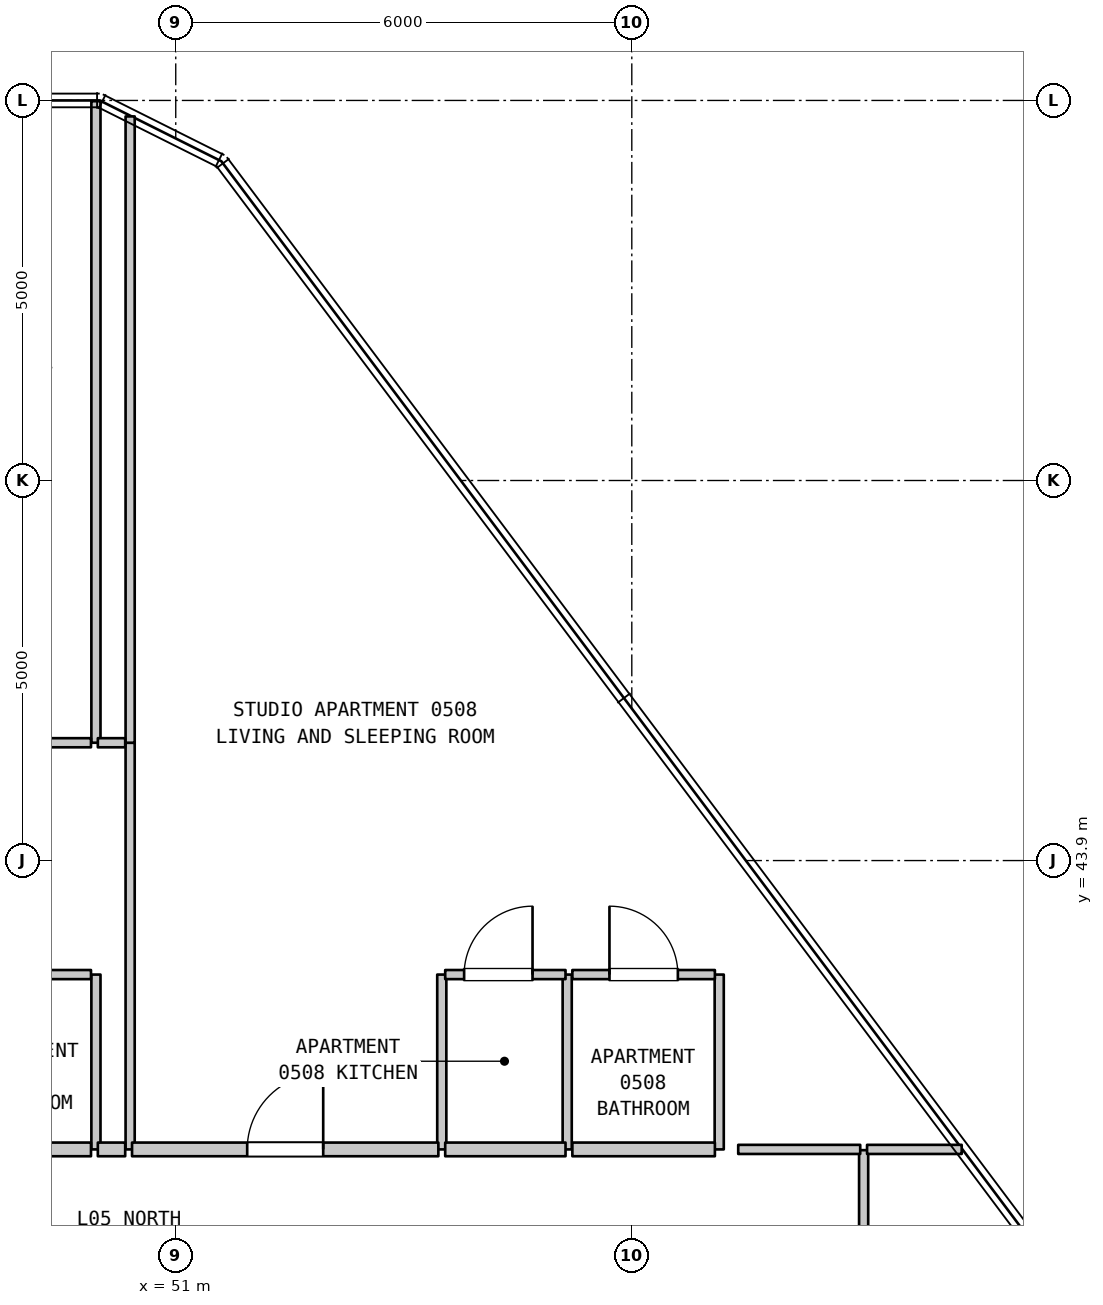
"""IFC4 building model, lengths in metres.
Left out: names, types, materials, properties, quantities, classifications, styles, units other than length and angle.
Written with IfcOpenShell. Run it as: python <this file> out.ifc"""

import sys

from ifc_helpers import new_model, si_unit, direction, frame, frame_2d, origin, place, context, subcontext, project, spatial, rectangle, extrude, element, fill, save


model = new_model("IFC4")
c1 = context("Model", 3, precision=1e-05, world=origin(), true_north=direction((0.0, 1.0)))
c2 = subcontext(c1, "Body", "Model", "MODEL_VIEW")
j1 = project(units=[si_unit("LENGTHUNIT", "METRE"), si_unit("PLANEANGLEUNIT", "RADIAN")], contexts=[c1])
p1 = place(None, origin())
s1 = spatial("IfcSite", under=j1, at=p1, CompositionType="ELEMENT")
p2 = place(p1, origin())
s2 = spatial("IfcBuilding", under=s1, at=p2, CompositionType="ELEMENT")
p3 = place(p2, frame((0.0, 0.0, 27.7)))
s3 = spatial("IfcBuildingStorey", under=s2, at=p3, CompositionType="ELEMENT", Elevation=27.7)
p4 = place(p3, frame((49.95, 40.1, 0.0), z_axis=(0.0, 0.0, 1.0), x_axis=(0.0, 1.0, 0.0)))
e1 = element("IfcWall", 1, at=p4, inside=s3, PredefinedType="PARTITIONING", context=c2, shape_type="SweptSolid", body=[
    extrude(rectangle(XDim=2.3, YDim=0.12, at=frame_2d((1.15, 0.0))), origin(), (0.0, 0.0, 1.0), 3.385),
])
p5 = place(p3, frame((49.95, 45.45, 0.0), z_axis=(0.0, 0.0, 1.0), x_axis=(0.0, 1.0, 0.0)))
e2 = element("IfcWall", 2, at=p5, inside=s3, PredefinedType="PARTITIONING", context=c2, shape_type="SweptSolid", body=[
    extrude(rectangle(XDim=8.44, YDim=0.12, at=frame_2d((4.22, 0.0))), origin(), (0.0, 0.0, 1.0), 3.385),
])
p6 = place(p3, frame((50.4, 40.1, 0.0), z_axis=(0.0, 0.0, 1.0), x_axis=(0.0, 1.0, 0.0)))
e3 = element("IfcWall", 3, at=p6, inside=s3, PredefinedType="PARTITIONING", context=c2, shape_type="SweptSolid", body=[
    extrude(rectangle(XDim=5.35, YDim=0.12, at=frame_2d((2.675, 0.0))), origin(), (0.0, 0.0, 1.0), 3.385),
])
p7 = place(p3, frame((50.4, 45.45, 0.0), z_axis=(0.0, 0.0, 1.0), x_axis=(0.0, 1.0, 0.0)))
e4 = element("IfcWall", 4, at=p7, inside=s3, PredefinedType="PARTITIONING", context=c2, shape_type="SweptSolid", body=[
    extrude(rectangle(XDim=8.24, YDim=0.12, at=frame_2d((4.12, 0.0))), origin(), (0.0, 0.0, 1.0), 3.385),
])
for number, where, z_axis, x_axis in (
    (5, (54.5, 40.1, 0.0), (0.0, 0.0, 1.0), (0.0, 1.0, 0.0)),
    (6, (56.15, 40.1, 0.0), (0.0, 0.0, 1.0), (0.0, 1.0, 0.0)),
    (7, (58.15, 40.1, 0.0), (0.0, 0.0, 1.0), (0.0, 1.0, 0.0)),
):
    element("IfcWall", number, at=place(p3, frame(where, z_axis=z_axis, x_axis=x_axis)), inside=s3, PredefinedType="PARTITIONING", context=c2, shape_type="SweptSolid", body=[
        extrude(rectangle(XDim=2.3, YDim=0.12, at=frame_2d((1.15, 0.0))), origin(), (0.0, 0.0, 1.0), 3.385),
    ])
p8 = place(p3, frame((60.05, 37.89, 0.0), z_axis=(0.0, 0.0, 1.0), x_axis=(0.0, 1.0, 0.0)))
e8 = element("IfcWall", 8, at=p8, inside=s3, PredefinedType="PARTITIONING", context=c2, shape_type="SweptSolid", body=[
    extrude(rectangle(XDim=2.2, YDim=0.12, at=frame_2d((1.1, 0.0))), origin(), (0.0, 0.0, 1.0), 3.385),
])
p9 = place(p3, frame((45.963, 40.1, 0.0), z_axis=(0.0, 0.0, 1.0), x_axis=(1.0, 0.0, 0.0)))
e9 = element("IfcWall", 9, at=p9, inside=s3, PredefinedType="STANDARD", context=c2, shape_type="SweptSolid", body=[
    extrude(rectangle(XDim=3.922, YDim=0.18, at=frame_2d((1.961, 0.0))), origin(), (0.0, 0.0, 1.0), 3.385),
])
p10 = place(p3, frame((49.975, 40.1, 0.0), z_axis=(0.0, 0.0, 1.0), x_axis=(1.0, 0.0, 0.0)))
e10 = element("IfcWall", 10, at=p10, inside=s3, PredefinedType="STANDARD", context=c2, shape_type="SweptSolid", body=[
    extrude(rectangle(XDim=0.36, YDim=0.18, at=frame_2d((0.18, 0.0))), origin(), (0.0, 0.0, 1.0), 3.385),
])
p11 = place(p3, frame((50.425, 40.1, 0.0), z_axis=(0.0, 0.0, 1.0), x_axis=(1.0, 0.0, 0.0)))
e11 = element("IfcWall", 11, at=p11, inside=s3, PredefinedType="STANDARD", context=c2, shape_type="SweptSolid", body=[
    extrude(rectangle(XDim=4.03, YDim=0.18, at=frame_2d((2.015, 0.0))), origin(), (0.0, 0.0, 1.0), 3.385),
])
p12 = place(p11, frame((1.515, 0.0, 0.0)))
e12 = element("IfcOpeningElement", 12, at=p12, cuts=e11, PredefinedType="OPENING", context=c2, shape_type="SweptSolid", body=[
    extrude(rectangle(XDim=1.0, YDim=2.15, at=frame_2d((0.5, 1.075))), frame((0.0, 0.1, 0.0), z_axis=(0.0, -1.0, 0.0), x_axis=(1.0, 0.0, 0.0)), (0.0, 0.0, 1.0), 0.2),
])
p13 = place(p3, frame((54.545, 40.1, 0.0), z_axis=(0.0, 0.0, 1.0), x_axis=(1.0, 0.0, 0.0)))
e13 = element("IfcWall", 13, at=p13, inside=s3, PredefinedType="STANDARD", context=c2, shape_type="SweptSolid", body=[
    extrude(rectangle(XDim=1.583, YDim=0.18, at=frame_2d((0.792, 0.0))), origin(), (0.0, 0.0, 1.0), 3.385),
])
p14 = place(p3, frame((56.218, 40.1, 0.0), z_axis=(0.0, 0.0, 1.0), x_axis=(1.0, 0.0, 0.0)))
e14 = element("IfcWall", 14, at=p14, inside=s3, PredefinedType="STANDARD", context=c2, shape_type="SweptSolid", body=[
    extrude(rectangle(XDim=1.875, YDim=0.18, at=frame_2d((0.938, 0.0))), origin(), (0.0, 0.0, 1.0), 3.385),
])
p15 = place(p3, frame((58.4, 40.1, 0.0), z_axis=(0.0, 0.0, 1.0), x_axis=(1.0, 0.0, 0.0)))
e15 = element("IfcWall", 15, at=p15, inside=s3, PredefinedType="PARTITIONING", context=c2, shape_type="SweptSolid", body=[
    extrude(rectangle(XDim=1.605, YDim=0.12, at=frame_2d((0.802, 0.0))), origin(), (0.0, 0.0, 1.0), 3.385),
])
p16 = place(p3, frame((60.095, 40.1, 0.0), z_axis=(0.0, 0.0, 1.0), x_axis=(1.0, 0.0, 0.0)))
e16 = element("IfcWall", 16, at=p16, inside=s3, PredefinedType="PARTITIONING", context=c2, shape_type="SweptSolid", body=[
    extrude(rectangle(XDim=1.245, YDim=0.12, at=frame_2d((0.623, 0.0))), origin(), (0.0, 0.0, 1.0), 3.385),
])
p17 = place(p3, frame((45.963, 42.4, 0.0), z_axis=(0.0, 0.0, 1.0), x_axis=(1.0, 0.0, 0.0)))
e17 = element("IfcWall", 17, at=p17, inside=s3, PredefinedType="PARTITIONING", context=c2, shape_type="SweptSolid", body=[
    extrude(rectangle(XDim=3.922, YDim=0.12, at=frame_2d((1.961, 0.0))), origin(), (0.0, 0.0, 1.0), 3.385),
])
p18 = place(p17, frame((1.511, 0.0, 0.0)))
e18 = element("IfcOpeningElement", 18, at=p18, cuts=e17, PredefinedType="OPENING", context=c2, shape_type="SweptSolid", body=[
    extrude(rectangle(XDim=0.9, YDim=2.1, at=frame_2d((0.45, 1.05))), frame((0.0, 0.07, 0.0), z_axis=(0.0, -1.0, 0.0), x_axis=(1.0, 0.0, 0.0)), (0.0, 0.0, 1.0), 0.14),
])
p19 = place(p3, frame((54.545, 42.4, 0.0), z_axis=(0.0, 0.0, 1.0), x_axis=(1.0, 0.0, 0.0)))
e19 = element("IfcWall", 19, at=p19, inside=s3, PredefinedType="PARTITIONING", context=c2, shape_type="SweptSolid", body=[
    extrude(rectangle(XDim=1.583, YDim=0.12, at=frame_2d((0.792, 0.0))), origin(), (0.0, 0.0, 1.0), 3.385),
])
p20 = place(p19, frame((0.249, 0.0, 0.0)))
e20 = element("IfcOpeningElement", 20, at=p20, cuts=e19, PredefinedType="OPENING", context=c2, shape_type="SweptSolid", body=[
    extrude(rectangle(XDim=0.9, YDim=2.15, at=frame_2d((0.45, 1.075))), frame((0.0, 0.07, 0.0), z_axis=(0.0, -1.0, 0.0), x_axis=(1.0, 0.0, 0.0)), (0.0, 0.0, 1.0), 0.14),
])
p21 = place(p3, frame((56.218, 42.4, 0.0), z_axis=(0.0, 0.0, 1.0), x_axis=(1.0, 0.0, 0.0)))
e21 = element("IfcWall", 21, at=p21, inside=s3, PredefinedType="PARTITIONING", context=c2, shape_type="SweptSolid", body=[
    extrude(rectangle(XDim=1.875, YDim=0.12, at=frame_2d((0.938, 0.0))), origin(), (0.0, 0.0, 1.0), 3.385),
])
p22 = place(p21, frame((0.488, 0.0, 0.0)))
e22 = element("IfcOpeningElement", 22, at=p22, cuts=e21, PredefinedType="OPENING", context=c2, shape_type="SweptSolid", body=[
    extrude(rectangle(XDim=0.9, YDim=2.1, at=frame_2d((0.45, 1.05))), frame((0.0, 0.07, 0.0), z_axis=(0.0, -1.0, 0.0), x_axis=(1.0, 0.0, 0.0)), (0.0, 0.0, 1.0), 0.14),
])
p23 = place(p3, frame((42.545, 45.45, 0.0), z_axis=(0.0, 0.0, 1.0), x_axis=(1.0, 0.0, 0.0)))
e23 = element("IfcWall", 23, at=p23, inside=s3, PredefinedType="PARTITIONING", context=c2, shape_type="SweptSolid", body=[
    extrude(rectangle(XDim=7.34, YDim=0.12, at=frame_2d((3.67, 0.0))), origin(), (0.0, 0.0, 1.0), 3.385),
])
p24 = place(p23, frame((0.846, 0.0, 0.0)))
e24 = element("IfcOpeningElement", 24, at=p24, cuts=e23, PredefinedType="OPENING", context=c2, shape_type="SweptSolid", body=[
    extrude(rectangle(XDim=0.9, YDim=2.15, at=frame_2d((0.45, 1.075))), frame((0.0, 0.07, 0.0), z_axis=(0.0, -1.0, 0.0), x_axis=(1.0, 0.0, 0.0)), (0.0, 0.0, 1.0), 0.14),
])
p25 = place(p23, frame((3.145, 0.0, 0.0)))
e25 = element("IfcOpeningElement", 25, at=p25, cuts=e23, PredefinedType="OPENING", context=c2, shape_type="SweptSolid", body=[
    extrude(rectangle(XDim=0.9, YDim=2.15, at=frame_2d((0.45, 1.075))), frame((0.0, 0.07, 0.0), z_axis=(0.0, -1.0, 0.0), x_axis=(1.0, 0.0, 0.0)), (0.0, 0.0, 1.0), 0.14),
])
p26 = place(p23, frame((5.449, 0.0, 0.0)))
e26 = element("IfcOpeningElement", 26, at=p26, cuts=e23, PredefinedType="OPENING", context=c2, shape_type="SweptSolid", body=[
    extrude(rectangle(XDim=0.9, YDim=2.15, at=frame_2d((0.45, 1.075))), frame((0.0, 0.07, 0.0), z_axis=(0.0, -1.0, 0.0), x_axis=(1.0, 0.0, 0.0)), (0.0, 0.0, 1.0), 0.14),
])
p27 = place(p3, frame((49.975, 45.45, 0.0), z_axis=(0.0, 0.0, 1.0), x_axis=(1.0, 0.0, 0.0)))
e27 = element("IfcWall", 27, at=p27, inside=s3, PredefinedType="PARTITIONING", context=c2, shape_type="SweptSolid", body=[
    extrude(rectangle(XDim=0.36, YDim=0.12, at=frame_2d((0.18, 0.0))), origin(), (0.0, 0.0, 1.0), 3.385),
])
p28 = place(p12, origin())
e28 = element("IfcDoor", 28, at=p28, inside=s3, OperationType="SINGLE_SWING_RIGHT", PredefinedType="DOOR", context=c2, shape_type="SweptSolid", body=[
    extrude(rectangle(XDim=1.0, YDim=2.15, at=frame_2d((0.5, 1.075))), frame((0.0, 0.025, 0.0), z_axis=(0.0, -1.0, 0.0), x_axis=(1.0, 0.0, 0.0)), (0.0, 0.0, 1.0), 0.05),
])
fill(e12, e28)
p29 = place(p20, origin())
e29 = element("IfcDoor", 29, at=p29, inside=s3, OperationType="SINGLE_SWING_RIGHT", PredefinedType="DOOR", context=c2, shape_type="SweptSolid", body=[
    extrude(rectangle(XDim=0.9, YDim=2.15, at=frame_2d((0.45, 1.075))), frame((0.0, 0.025, 0.0), z_axis=(0.0, -1.0, 0.0), x_axis=(1.0, 0.0, 0.0)), (0.0, 0.0, 1.0), 0.05),
])
fill(e20, e29)
p30 = place(p22, origin())
e30 = element("IfcDoor", 30, at=p30, inside=s3, OperationType="SINGLE_SWING_LEFT", PredefinedType="DOOR", context=c2, shape_type="SweptSolid", body=[
    extrude(rectangle(XDim=0.9, YDim=2.1, at=frame_2d((0.45, 1.05))), frame((0.0, 0.025, 0.0), z_axis=(0.0, -1.0, 0.0), x_axis=(1.0, 0.0, 0.0)), (0.0, 0.0, 1.0), 0.05),
])
fill(e22, e30)
save(model, sys.argv[1])
